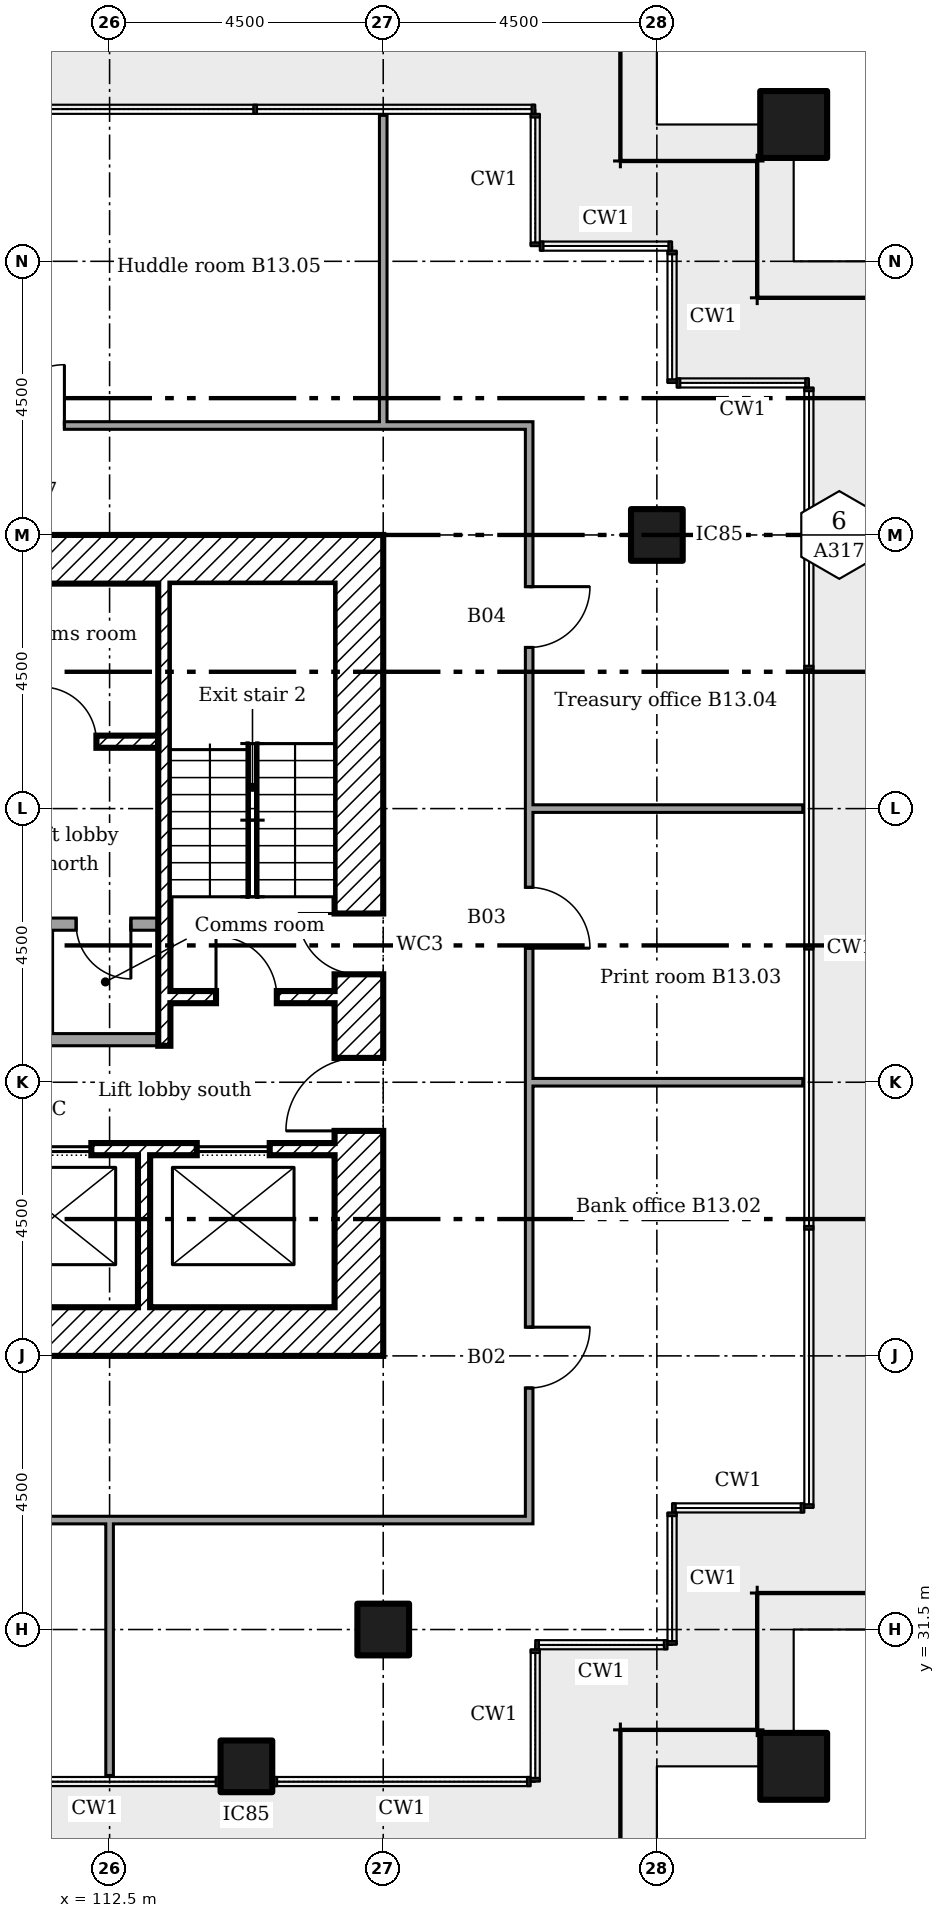
"""IFC4 building model, lengths in metres.
Left out: names, types, materials, properties, quantities, classifications, styles, units other than length and angle.
Written with IfcOpenShell. Run it as: python <this file> out.ifc"""

import sys

from ifc_helpers import new_model, si_unit, direction, frame, frame_2d, origin, origin_2d, place, context, subcontext, project, spatial, rectangle, extrude, element, fill, save


model = new_model("IFC4")
c1 = context("Model", 3, precision=1e-05, world=origin(), true_north=direction((0.0, 1.0)))
c2 = subcontext(c1, "Body", "Model", "MODEL_VIEW")
j1 = project(units=[si_unit("LENGTHUNIT", "METRE"), si_unit("PLANEANGLEUNIT", "RADIAN")], contexts=[c1])
p1 = place(None, origin())
s1 = spatial("IfcSite", under=j1, at=p1, CompositionType="ELEMENT")
p2 = place(p1, origin())
s2 = spatial("IfcBuilding", under=s1, at=p2, CompositionType="ELEMENT")
p3 = place(p2, frame((0.0, 0.0, 58.2)))
s3 = spatial("IfcBuildingStorey", under=s2, at=p3, CompositionType="ELEMENT", Elevation=58.2)
for number, where in (
    (1, (123.75, 29.25, 0.0)),
    (2, (123.75, 56.25, 0.0)),
):
    element("IfcColumn", number, at=place(p3, frame(where)), inside=s3, PredefinedType="COLUMN", context=c2, shape_type="SweptSolid", body=[
        extrude(rectangle(XDim=1.1, YDim=1.1, at=origin_2d()), origin(), (0.0, 0.0, 1.0), 3.6),
    ])
for number, where in (
    (3, (114.75, 29.25, 0.0)),
    (4, (117.0, 31.5, 0.0)),
    (5, (121.5, 49.5, 0.0)),
):
    element("IfcColumn", number, at=place(p3, frame(where)), inside=s3, PredefinedType="COLUMN", context=c2, shape_type="SweptSolid", body=[
        extrude(rectangle(XDim=0.85, YDim=0.85, at=origin_2d()), origin(), (0.0, 0.0, 1.0), 3.6),
    ])
p4 = place(p3, frame((116.6, 36.0, 0.0), z_axis=(0.0, 0.0, 1.0), x_axis=(0.0, 1.0, 0.0)))
e6 = element("IfcWall", 6, at=p4, inside=s3, PredefinedType="SHEAR", context=c2, shape_type="SweptSolid", body=[
    extrude(rectangle(XDim=13.5, YDim=0.8, at=frame_2d((6.75, 0.0))), origin(), (0.0, 0.0, 1.0), 3.35),
])
p5 = place(p4, frame((3.7, 0.0, 0.0)))
e7 = element("IfcOpeningElement", 7, at=p5, cuts=e6, PredefinedType="OPENING", context=c2, shape_type="SweptSolid", body=[
    extrude(rectangle(XDim=1.2, YDim=2.1, at=frame_2d((0.6, 1.05))), frame((0.0, 0.41, 0.0), z_axis=(0.0, -1.0, 0.0), x_axis=(1.0, 0.0, 0.0)), (0.0, 0.0, 1.0), 0.82),
])
p6 = place(p4, frame((6.275, 0.0, 0.0)))
e8 = element("IfcOpeningElement", 8, at=p6, cuts=e6, PredefinedType="OPENING", context=c2, shape_type="SweptSolid", body=[
    extrude(rectangle(XDim=1.0, YDim=2.1, at=frame_2d((0.5, 1.05))), frame((0.0, 0.41, 0.0), z_axis=(0.0, -1.0, 0.0), x_axis=(1.0, 0.0, 0.0)), (0.0, 0.0, 1.0), 0.82),
])
for number, where in (
    (9, (104.3, 49.1, 0.0)),
    (10, (104.3, 36.4, 0.0)),
):
    element("IfcWall", number, at=place(p3, frame(where)), inside=s3, PredefinedType="SHEAR", context=c2, shape_type="SweptSolid", body=[
        extrude(rectangle(XDim=11.9, YDim=0.8, at=frame_2d((5.95, 0.0))), origin(), (0.0, 0.0, 1.0), 3.35),
    ])
p7 = place(p3, frame((113.067, 36.8, 0.0), z_axis=(0.0, 0.0, 1.0), x_axis=(0.0, 1.0, 0.0)))
e11 = element("IfcWall", 11, at=p7, inside=s3, PredefinedType="SHEAR", context=c2, shape_type="SweptSolid", body=[
    extrude(rectangle(XDim=2.5, YDim=0.2, at=frame_2d((1.25, 0.0))), origin(), (0.0, 0.0, 1.0), 3.35),
])
p8 = place(p3, frame((110.467, 46.1, 0.0)))
e12 = element("IfcWall", 12, at=p8, inside=s3, PredefinedType="SHEAR", context=c2, shape_type="SweptSolid", body=[
    extrude(rectangle(XDim=2.833, YDim=0.2, at=frame_2d((1.417, 0.0))), origin(), (0.0, 0.0, 1.0), 3.35),
])
p9 = place(p8, frame((0.917, 0.0, 0.0)))
e13 = element("IfcOpeningElement", 13, at=p9, cuts=e12, PredefinedType="OPENING", context=c2, shape_type="SweptSolid", body=[
    extrude(rectangle(XDim=0.9, YDim=2.1, at=frame_2d((0.45, 1.05))), frame((0.0, 0.11, 0.0), z_axis=(0.0, -1.0, 0.0), x_axis=(1.0, 0.0, 0.0)), (0.0, 0.0, 1.0), 0.22),
])
p10 = place(p3, frame((107.2, 39.4, 0.0)))
e14 = element("IfcWall", 14, at=p10, inside=s3, PredefinedType="SHEAR", context=c2, shape_type="SweptSolid", body=[
    extrude(rectangle(XDim=9.0, YDim=0.2, at=frame_2d((4.5, 0.0))), origin(), (0.0, 0.0, 1.0), 3.35),
])
p11 = place(p10, frame((0.867, 0.0, 0.0)))
e15 = element("IfcOpeningElement", 15, at=p11, cuts=e14, PredefinedType="OPENING", context=c2, shape_type="SweptSolid", body=[
    extrude(rectangle(XDim=1.2, YDim=2.1, at=frame_2d((0.6, 1.05))), frame((0.0, 0.11, 0.0), z_axis=(0.0, -1.0, 0.0), x_axis=(1.0, 0.0, 0.0)), (0.0, 0.0, 1.0), 0.22),
])
p12 = place(p10, frame((3.8, 0.0, 0.0)))
e16 = element("IfcOpeningElement", 16, at=p12, cuts=e14, PredefinedType="OPENING", context=c2, shape_type="SweptSolid", body=[
    extrude(rectangle(XDim=1.2, YDim=2.1, at=frame_2d((0.6, 1.05))), frame((0.0, 0.11, 0.0), z_axis=(0.0, -1.0, 0.0), x_axis=(1.0, 0.0, 0.0)), (0.0, 0.0, 1.0), 0.22),
])
p13 = place(p10, frame((6.733, 0.0, 0.0)))
e17 = element("IfcOpeningElement", 17, at=p13, cuts=e14, PredefinedType="OPENING", context=c2, shape_type="SweptSolid", body=[
    extrude(rectangle(XDim=1.2, YDim=2.1, at=frame_2d((0.6, 1.05))), frame((0.0, 0.11, 0.0), z_axis=(0.0, -1.0, 0.0), x_axis=(1.0, 0.0, 0.0)), (0.0, 0.0, 1.0), 0.22),
])
p14 = place(p3, frame((113.5, 41.9, 0.0)))
e18 = element("IfcWall", 18, at=p14, inside=s3, PredefinedType="SHEAR", context=c2, shape_type="SweptSolid", body=[
    extrude(rectangle(XDim=2.7, YDim=0.2, at=frame_2d((1.35, 0.0))), origin(), (0.0, 0.0, 1.0), 3.35),
])
p15 = place(p14, frame((0.75, 0.0, 0.0)))
e19 = element("IfcOpeningElement", 19, at=p15, cuts=e18, PredefinedType="OPENING", context=c2, shape_type="SweptSolid", body=[
    extrude(rectangle(XDim=1.0, YDim=2.1, at=frame_2d((0.5, 1.05))), frame((0.0, 0.11, 0.0), z_axis=(0.0, -1.0, 0.0), x_axis=(1.0, 0.0, 0.0)), (0.0, 0.0, 1.0), 0.22),
])
p16 = place(p3, frame((113.4, 41.1, 0.0), z_axis=(0.0, 0.0, 1.0), x_axis=(0.0, 1.0, 0.0)))
e20 = element("IfcWall", 20, at=p16, inside=s3, PredefinedType="SHEAR", context=c2, shape_type="SweptSolid", body=[
    extrude(rectangle(XDim=7.6, YDim=0.2, at=frame_2d((3.8, 0.0))), origin(), (0.0, 0.0, 1.0), 3.35),
])
p17 = place(p3, frame((107.2, 43.1, 0.0)))
e21 = element("IfcWall", 21, at=p17, inside=s3, PredefinedType="PARTITIONING", context=c2, shape_type="SweptSolid", body=[
    extrude(rectangle(XDim=6.1, YDim=0.2, at=frame_2d((3.05, 0.0))), origin(), (0.0, 0.0, 1.0), 3.35),
])
p18 = place(p17, frame((4.75, 0.0, 0.0)))
e22 = element("IfcOpeningElement", 22, at=p18, cuts=e21, PredefinedType="OPENING", context=c2, shape_type="SweptSolid", body=[
    extrude(rectangle(XDim=0.9, YDim=2.1, at=frame_2d((0.45, 1.05))), frame((0.0, 0.11, 0.0), z_axis=(0.0, -1.0, 0.0), x_axis=(1.0, 0.0, 0.0)), (0.0, 0.0, 1.0), 0.22),
])
p19 = place(p3, frame((107.2, 41.2, 0.0)))
e23 = element("IfcWall", 23, at=p19, inside=s3, PredefinedType="PARTITIONING", context=c2, shape_type="SweptSolid", body=[
    extrude(rectangle(XDim=6.1, YDim=0.2, at=frame_2d((3.05, 0.0))), origin(), (0.0, 0.0, 1.0), 3.35),
])
p20 = place(p19, frame((0.8, 0.0, 0.0)))
e24 = element("IfcOpeningElement", 24, at=p20, cuts=e23, PredefinedType="OPENING", context=c2, shape_type="SweptSolid", body=[
    extrude(rectangle(XDim=0.9, YDim=2.1, at=frame_2d((0.45, 1.05))), frame((0.0, 0.11, 0.0), z_axis=(0.0, -1.0, 0.0), x_axis=(1.0, 0.0, 0.0)), (0.0, 0.0, 1.0), 0.22),
])
p21 = place(p19, frame((2.95, 0.0, 0.0)))
e25 = element("IfcOpeningElement", 25, at=p21, cuts=e23, PredefinedType="OPENING", context=c2, shape_type="SweptSolid", body=[
    extrude(rectangle(XDim=0.9, YDim=2.1, at=frame_2d((0.45, 1.05))), frame((0.0, 0.11, 0.0), z_axis=(0.0, -1.0, 0.0), x_axis=(1.0, 0.0, 0.0)), (0.0, 0.0, 1.0), 0.22),
])
p22 = place(p3, frame((100.137, 33.3, 0.0)))
e26 = element("IfcWall", 26, at=p22, inside=s3, PredefinedType="PARTITIONING", context=c2, shape_type="SweptSolid", body=[
    extrude(rectangle(XDim=19.325, YDim=0.125, at=frame_2d((9.663, 0.0))), origin(), (0.0, 0.0, 1.0), 3.45),
])
for number, where in (
    (27, (119.4, 40.5, 0.0)),
    (28, (119.4, 45.0, 0.0)),
):
    element("IfcWall", number, at=place(p3, frame(where)), inside=s3, PredefinedType="PARTITIONING", context=c2, shape_type="SweptSolid", body=[
        extrude(rectangle(XDim=4.5, YDim=0.125, at=frame_2d((2.25, 0.0))), origin(), (0.0, 0.0, 1.0), 2.851),
    ])
p23 = place(p3, frame((100.137, 51.3, 0.0)))
e29 = element("IfcWall", 29, at=p23, inside=s3, PredefinedType="PARTITIONING", context=c2, shape_type="SweptSolid", body=[
    extrude(rectangle(XDim=19.325, YDim=0.125, at=frame_2d((9.663, 0.0))), origin(), (0.0, 0.0, 1.0), 3.45),
])
p24 = place(p23, frame((10.619, 0.0, 0.0)))
e30 = element("IfcOpeningElement", 30, at=p24, cuts=e29, PredefinedType="OPENING", context=c2, shape_type="SweptSolid", body=[
    extrude(rectangle(XDim=1.0, YDim=2.1, at=frame_2d((0.5, 1.05))), frame((0.0, 0.073, 0.0), z_axis=(0.0, -1.0, 0.0), x_axis=(1.0, 0.0, 0.0)), (0.0, 0.0, 1.0), 0.145),
])
p25 = place(p23, frame((4.69, 0.0, 0.0)))
e31 = element("IfcOpeningElement", 31, at=p25, cuts=e29, PredefinedType="OPENING", context=c2, shape_type="SweptSolid", body=[
    extrude(rectangle(XDim=1.0, YDim=2.1, at=frame_2d((0.5, 1.05))), frame((0.0, 0.073, 0.0), z_axis=(0.0, -1.0, 0.0), x_axis=(1.0, 0.0, 0.0)), (0.0, 0.0, 1.0), 0.145),
])
p26 = place(p3, frame((112.5, 29.1, 0.0), z_axis=(0.0, 0.0, 1.0), x_axis=(0.0, 1.0, 0.0)))
e32 = element("IfcWall", 32, at=p26, inside=s3, PredefinedType="PARTITIONING", context=c2, shape_type="SweptSolid", body=[
    extrude(rectangle(XDim=4.2, YDim=0.125, at=frame_2d((2.1, 0.0))), origin(), (0.0, 0.0, 1.0), 2.851),
])
p27 = place(p3, frame((117.0, 51.3, 0.0), z_axis=(0.0, 0.0, 1.0), x_axis=(0.0, 1.0, 0.0)))
e33 = element("IfcWall", 33, at=p27, inside=s3, PredefinedType="PARTITIONING", context=c2, shape_type="SweptSolid", body=[
    extrude(rectangle(XDim=5.1, YDim=0.125, at=frame_2d((2.55, 0.0))), origin(), (0.0, 0.0, 1.0), 2.851),
])
p28 = place(p3, frame((119.4, 33.363, 0.0), z_axis=(0.0, 0.0, 1.0), x_axis=(0.0, 1.0, 0.0)))
e34 = element("IfcWall", 34, at=p28, inside=s3, PredefinedType="PARTITIONING", context=c2, shape_type="SweptSolid", body=[
    extrude(rectangle(XDim=17.875, YDim=0.125, at=frame_2d((8.938, 0.0))), origin(), (0.0, 0.0, 1.0), 3.45),
])
p29 = place(p28, frame((2.11, 0.0, 0.0)))
e35 = element("IfcOpeningElement", 35, at=p29, cuts=e34, PredefinedType="OPENING", context=c2, shape_type="SweptSolid", body=[
    extrude(rectangle(XDim=1.0, YDim=2.1, at=frame_2d((0.5, 1.05))), frame((0.0, 0.073, 0.0), z_axis=(0.0, -1.0, 0.0), x_axis=(1.0, 0.0, 0.0)), (0.0, 0.0, 1.0), 0.145),
])
p30 = place(p28, frame((9.343, 0.0, 0.0)))
e36 = element("IfcOpeningElement", 36, at=p30, cuts=e34, PredefinedType="OPENING", context=c2, shape_type="SweptSolid", body=[
    extrude(rectangle(XDim=1.0, YDim=2.1, at=frame_2d((0.5, 1.05))), frame((0.0, 0.073, 0.0), z_axis=(0.0, -1.0, 0.0), x_axis=(1.0, 0.0, 0.0)), (0.0, 0.0, 1.0), 0.145),
])
p31 = place(p28, frame((14.288, 0.0, 0.0)))
e37 = element("IfcOpeningElement", 37, at=p31, cuts=e34, PredefinedType="OPENING", context=c2, shape_type="SweptSolid", body=[
    extrude(rectangle(XDim=1.0, YDim=2.1, at=frame_2d((0.5, 1.05))), frame((0.0, 0.073, 0.0), z_axis=(0.0, -1.0, 0.0), x_axis=(1.0, 0.0, 0.0)), (0.0, 0.0, 1.0), 0.145),
])
p32 = place(p5, origin())
e38 = element("IfcDoor", 38, at=p32, inside=s3, OperationType="SINGLE_SWING_RIGHT", PredefinedType="DOOR", context=c2, shape_type="SweptSolid", body=[
    extrude(rectangle(XDim=1.2, YDim=2.1, at=frame_2d((0.6, 1.05))), frame((0.0, 0.025, 0.0), z_axis=(0.0, -1.0, 0.0), x_axis=(1.0, 0.0, 0.0)), (0.0, 0.0, 1.0), 0.05),
])
fill(e7, e38)
p33 = place(p15, origin())
e39 = element("IfcDoor", 39, at=p33, inside=s3, OperationType="SINGLE_SWING_RIGHT", PredefinedType="DOOR", context=c2, shape_type="SweptSolid", body=[
    extrude(rectangle(XDim=1.0, YDim=2.1, at=frame_2d((0.5, 1.05))), frame((0.0, 0.025, 0.0), z_axis=(0.0, -1.0, 0.0), x_axis=(1.0, 0.0, 0.0)), (0.0, 0.0, 1.0), 0.05),
])
fill(e19, e39)
p34 = place(p6, origin())
e40 = element("IfcDoor", 40, at=p34, inside=s3, OperationType="SINGLE_SWING_LEFT", PredefinedType="DOOR", context=c2, shape_type="SweptSolid", body=[
    extrude(rectangle(XDim=1.0, YDim=2.1, at=frame_2d((0.5, 1.05))), frame((0.0, 0.025, 0.0), z_axis=(0.0, -1.0, 0.0), x_axis=(1.0, 0.0, 0.0)), (0.0, 0.0, 1.0), 0.05),
])
fill(e8, e40)
p35 = place(p9, origin())
e41 = element("IfcDoor", 41, at=p35, inside=s3, OperationType="SINGLE_SWING_RIGHT", PredefinedType="DOOR", context=c2, shape_type="SweptSolid", body=[
    extrude(rectangle(XDim=0.9, YDim=2.1, at=frame_2d((0.45, 1.05))), frame((0.0, 0.025, 0.0), z_axis=(0.0, -1.0, 0.0), x_axis=(1.0, 0.0, 0.0)), (0.0, 0.0, 1.0), 0.05),
])
fill(e13, e41)
p36 = place(p18, frame((0.9, 0.0, 0.0), x_axis=(-1.0, 0.0, 0.0)))
e42 = element("IfcDoor", 42, at=p36, inside=s3, OperationType="SINGLE_SWING_RIGHT", PredefinedType="DOOR", context=c2, shape_type="SweptSolid", body=[
    extrude(rectangle(XDim=0.9, YDim=2.1, at=frame_2d((0.45, 1.05))), frame((0.0, 0.025, 0.0), z_axis=(0.0, -1.0, 0.0), x_axis=(1.0, 0.0, 0.0)), (0.0, 0.0, 1.0), 0.05),
])
fill(e22, e42)
p37 = place(p12, origin())
e43 = element("IfcDoor", 43, at=p37, inside=s3, OperationType="SLIDING_TO_LEFT", PredefinedType="DOOR", context=c2, shape_type="SweptSolid", body=[
    extrude(rectangle(XDim=1.2, YDim=2.1, at=frame_2d((0.6, 1.05))), frame((0.0, 0.025, 0.0), z_axis=(0.0, -1.0, 0.0), x_axis=(1.0, 0.0, 0.0)), (0.0, 0.0, 1.0), 0.05),
])
fill(e16, e43)
p38 = place(p13, origin())
e44 = element("IfcDoor", 44, at=p38, inside=s3, OperationType="SLIDING_TO_LEFT", PredefinedType="DOOR", context=c2, shape_type="SweptSolid", body=[
    extrude(rectangle(XDim=1.2, YDim=2.1, at=frame_2d((0.6, 1.05))), frame((0.0, 0.025, 0.0), z_axis=(0.0, -1.0, 0.0), x_axis=(1.0, 0.0, 0.0)), (0.0, 0.0, 1.0), 0.05),
])
fill(e17, e44)
p39 = place(p29, frame((1.0, 0.0, 0.0), x_axis=(-1.0, 0.0, 0.0)))
e45 = element("IfcDoor", 45, at=p39, inside=s3, OperationType="SINGLE_SWING_RIGHT", PredefinedType="DOOR", context=c2, shape_type="SweptSolid", body=[
    extrude(rectangle(XDim=1.0, YDim=2.1, at=frame_2d((0.5, 1.05))), frame((0.0, 0.025, 0.0), z_axis=(0.0, -1.0, 0.0), x_axis=(1.0, 0.0, 0.0)), (0.0, 0.0, 1.0), 0.05),
])
fill(e35, e45)
p40 = place(p30, frame((1.0, 0.0, 0.0), x_axis=(-1.0, 0.0, 0.0)))
e46 = element("IfcDoor", 46, at=p40, inside=s3, OperationType="SINGLE_SWING_LEFT", PredefinedType="DOOR", context=c2, shape_type="SweptSolid", body=[
    extrude(rectangle(XDim=1.0, YDim=2.1, at=frame_2d((0.5, 1.05))), frame((0.0, 0.025, 0.0), z_axis=(0.0, -1.0, 0.0), x_axis=(1.0, 0.0, 0.0)), (0.0, 0.0, 1.0), 0.05),
])
fill(e36, e46)
p41 = place(p31, frame((1.0, 0.0, 0.0), x_axis=(-1.0, 0.0, 0.0)))
e47 = element("IfcDoor", 47, at=p41, inside=s3, OperationType="SINGLE_SWING_RIGHT", PredefinedType="DOOR", context=c2, shape_type="SweptSolid", body=[
    extrude(rectangle(XDim=1.0, YDim=2.1, at=frame_2d((0.5, 1.05))), frame((0.0, 0.025, 0.0), z_axis=(0.0, -1.0, 0.0), x_axis=(1.0, 0.0, 0.0)), (0.0, 0.0, 1.0), 0.05),
])
fill(e37, e47)
p42 = place(p24, origin())
e48 = element("IfcDoor", 48, at=p42, inside=s3, OperationType="SINGLE_SWING_LEFT", PredefinedType="DOOR", context=c2, shape_type="SweptSolid", body=[
    extrude(rectangle(XDim=1.0, YDim=2.1, at=frame_2d((0.5, 1.05))), frame((0.0, 0.025, 0.0), z_axis=(0.0, -1.0, 0.0), x_axis=(1.0, 0.0, 0.0)), (0.0, 0.0, 1.0), 0.05),
])
fill(e30, e48)
save(model, sys.argv[1])
